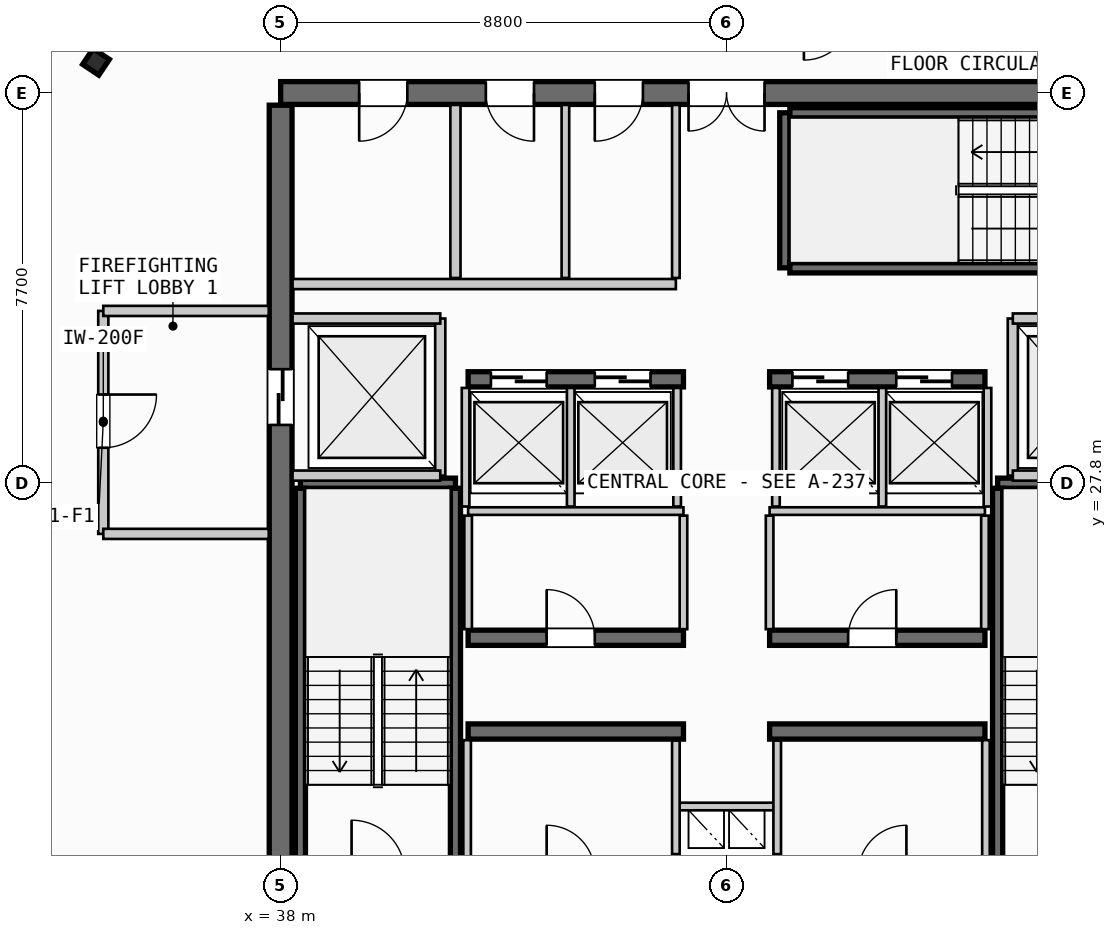
"""IFC4 building model, lengths in metres.
Left out: names, types, materials, properties, quantities, classifications, styles, units other than length and angle.
Written with IfcOpenShell. Run it as: python <this file> out.ifc"""

import sys

from ifc_helpers import new_model, si_unit, direction, frame, frame_2d, origin, origin_2d, place, context, subcontext, project, spatial, rectangle, i_section, extrude, source, transform, mapped, element, fill, save


model = new_model("IFC4")
c1 = context("Model", 3, precision=1e-05, world=origin(), true_north=direction((0.0, 1.0)))
c2 = subcontext(c1, "Body", "Model", "MODEL_VIEW")
j1 = project(units=[si_unit("LENGTHUNIT", "METRE"), si_unit("PLANEANGLEUNIT", "RADIAN")], contexts=[c1])
p1 = place(None, origin())
s1 = spatial("IfcSite", under=j1, at=p1, CompositionType="ELEMENT")
p2 = place(p1, origin())
s2 = spatial("IfcBuilding", under=s1, at=p2, CompositionType="ELEMENT")
p3 = place(p2, frame((0.0, 0.0, 269.8)))
s3 = spatial("IfcBuildingStorey", under=s2, at=p3, CompositionType="ELEMENT", Elevation=269.8)
p4 = place(p3, frame((55.6, 35.5, 0.0), z_axis=(0.0, 0.0, 1.0), x_axis=(-1.0, 0.0, 0.0)))
e1 = element("IfcWall", 1, at=p4, inside=s3, PredefinedType="SHEAR", context=c2, shape_type="SweptSolid", body=[
    extrude(rectangle(XDim=17.6, YDim=0.45, at=frame_2d((8.8, 0.0))), origin(), (0.0, 0.0, 1.0), 3.21),
])
p5 = place(p4, frame((8.05, 0.0, 0.0)))
e2 = element("IfcOpeningElement", 2, at=p5, cuts=e1, PredefinedType="OPENING", context=c2, shape_type="SweptSolid", body=[
    extrude(rectangle(XDim=1.5, YDim=2.2, at=frame_2d((0.75, 1.1))), frame((0.0, 0.235, 0.0), z_axis=(0.0, -1.0, 0.0), x_axis=(1.0, 0.0, 0.0)), (0.0, 0.0, 1.0), 0.47),
])
p6 = place(p4, frame((15.1, 0.0, 0.0)))
e3 = element("IfcOpeningElement", 3, at=p6, cuts=e1, PredefinedType="OPENING", context=c2, shape_type="SweptSolid", body=[
    extrude(rectangle(XDim=0.95, YDim=2.15, at=frame_2d((0.475, 1.075))), frame((0.0, 0.235, 0.0), z_axis=(0.0, -1.0, 0.0), x_axis=(1.0, 0.0, 0.0)), (0.0, 0.0, 1.0), 0.47),
])
p7 = place(p4, frame((12.6, 0.0, 0.0)))
e4 = element("IfcOpeningElement", 4, at=p7, cuts=e1, PredefinedType="OPENING", context=c2, shape_type="SweptSolid", body=[
    extrude(rectangle(XDim=0.95, YDim=2.15, at=frame_2d((0.475, 1.075))), frame((0.0, 0.235, 0.0), z_axis=(0.0, -1.0, 0.0), x_axis=(1.0, 0.0, 0.0)), (0.0, 0.0, 1.0), 0.47),
])
p8 = place(p4, frame((10.45, 0.0, 0.0)))
e5 = element("IfcOpeningElement", 5, at=p8, cuts=e1, PredefinedType="OPENING", context=c2, shape_type="SweptSolid", body=[
    extrude(rectangle(XDim=0.95, YDim=2.15, at=frame_2d((0.475, 1.075))), frame((0.0, 0.235, 0.0), z_axis=(0.0, -1.0, 0.0), x_axis=(1.0, 0.0, 0.0)), (0.0, 0.0, 1.0), 0.47),
])
p9 = place(p3, frame((38.0, 35.26, 0.0), z_axis=(0.0, 0.0, 1.0), x_axis=(0.0, -1.0, 0.0)))
e6 = element("IfcWall", 6, at=p9, inside=s3, PredefinedType="SHEAR", context=c2, shape_type="SweptSolid", body=[
    extrude(rectangle(XDim=14.92, YDim=0.45, at=frame_2d((7.46, 0.0))), origin(), (0.0, 0.0, 1.0), 3.21),
])
p10 = place(p9, frame((5.21, 0.0, 0.0)))
e7 = element("IfcOpeningElement", 7, at=p10, cuts=e6, PredefinedType="OPENING", context=c2, shape_type="SweptSolid", body=[
    extrude(rectangle(XDim=1.1, YDim=2.2, at=frame_2d((0.55, 1.1))), frame((0.0, 0.235, 0.0), z_axis=(0.0, -1.0, 0.0), x_axis=(1.0, 0.0, 0.0)), (0.0, 0.0, 1.0), 0.47),
])
for number, where, z_axis, x_axis in (
    (8, (41.7, 22.9, 0.0), (0.0, 0.0, 1.0), (1.0, 0.0, 0.0)),
    (9, (47.65, 22.9, 0.0), (0.0, 0.0, 1.0), (1.0, 0.0, 0.0)),
):
    element("IfcWall", number, at=place(p3, frame(where, z_axis=z_axis, x_axis=x_axis)), inside=s3, PredefinedType="SHEAR", context=c2, shape_type="SweptSolid", body=[
        extrude(rectangle(XDim=4.25, YDim=0.3, at=frame_2d((2.125, 0.0))), origin(), (0.0, 0.0, 1.0), 3.21),
    ])
p11 = place(p3, frame((41.7, 24.75, 0.0), z_axis=(0.0, 0.0, 1.0), x_axis=(1.0, 0.0, 0.0)))
e10 = element("IfcWall", 10, at=p11, inside=s3, PredefinedType="SHEAR", context=c2, shape_type="SweptSolid", body=[
    extrude(rectangle(XDim=4.25, YDim=0.3, at=frame_2d((2.125, 0.0))), origin(), (0.0, 0.0, 1.0), 3.21),
])
p12 = place(p11, frame((1.55, 0.0, 0.0)))
e11 = element("IfcOpeningElement", 11, at=p12, cuts=e10, PredefinedType="OPENING", context=c2, shape_type="SweptSolid", body=[
    extrude(rectangle(XDim=0.95, YDim=2.15, at=frame_2d((0.475, 1.075))), frame((0.0, 0.16, 0.0), z_axis=(0.0, -1.0, 0.0), x_axis=(1.0, 0.0, 0.0)), (0.0, 0.0, 1.0), 0.32),
])
p13 = place(p3, frame((47.65, 24.75, 0.0), z_axis=(0.0, 0.0, 1.0), x_axis=(1.0, 0.0, 0.0)))
e12 = element("IfcWall", 12, at=p13, inside=s3, PredefinedType="SHEAR", context=c2, shape_type="SweptSolid", body=[
    extrude(rectangle(XDim=4.25, YDim=0.3, at=frame_2d((2.125, 0.0))), origin(), (0.0, 0.0, 1.0), 3.21),
])
p14 = place(p13, frame((1.55, 0.0, 0.0)))
e13 = element("IfcOpeningElement", 13, at=p14, cuts=e12, PredefinedType="OPENING", context=c2, shape_type="SweptSolid", body=[
    extrude(rectangle(XDim=0.95, YDim=2.15, at=frame_2d((0.475, 1.075))), frame((0.0, 0.16, 0.0), z_axis=(0.0, -1.0, 0.0), x_axis=(1.0, 0.0, 0.0)), (0.0, 0.0, 1.0), 0.32),
])
p15 = place(p3, frame((41.7, 29.85, 0.0), z_axis=(0.0, 0.0, 1.0), x_axis=(1.0, 0.0, 0.0)))
e14 = element("IfcWall", 14, at=p15, inside=s3, PredefinedType="SHEAR", context=c2, shape_type="SweptSolid", body=[
    extrude(rectangle(XDim=4.25, YDim=0.3, at=frame_2d((2.125, 0.0))), origin(), (0.0, 0.0, 1.0), 3.21),
])
p16 = place(p15, frame((0.45, 0.0, 0.0)))
e15 = element("IfcOpeningElement", 15, at=p16, cuts=e14, PredefinedType="OPENING", context=c2, shape_type="SweptSolid", body=[
    extrude(rectangle(XDim=1.1, YDim=2.2, at=frame_2d((0.55, 1.1))), frame((0.0, 0.16, 0.0), z_axis=(0.0, -1.0, 0.0), x_axis=(1.0, 0.0, 0.0)), (0.0, 0.0, 1.0), 0.32),
])
p17 = place(p15, frame((2.5, 0.0, 0.0)))
e16 = element("IfcOpeningElement", 16, at=p17, cuts=e14, PredefinedType="OPENING", context=c2, shape_type="SweptSolid", body=[
    extrude(rectangle(XDim=1.1, YDim=2.2, at=frame_2d((0.55, 1.1))), frame((0.0, 0.16, 0.0), z_axis=(0.0, -1.0, 0.0), x_axis=(1.0, 0.0, 0.0)), (0.0, 0.0, 1.0), 0.32),
])
p18 = place(p3, frame((47.65, 29.85, 0.0), z_axis=(0.0, 0.0, 1.0), x_axis=(1.0, 0.0, 0.0)))
e17 = element("IfcWall", 17, at=p18, inside=s3, PredefinedType="SHEAR", context=c2, shape_type="SweptSolid", body=[
    extrude(rectangle(XDim=4.25, YDim=0.3, at=frame_2d((2.125, 0.0))), origin(), (0.0, 0.0, 1.0), 3.21),
])
p19 = place(p18, frame((0.45, 0.0, 0.0)))
e18 = element("IfcOpeningElement", 18, at=p19, cuts=e17, PredefinedType="OPENING", context=c2, shape_type="SweptSolid", body=[
    extrude(rectangle(XDim=1.1, YDim=2.2, at=frame_2d((0.55, 1.1))), frame((0.0, 0.16, 0.0), z_axis=(0.0, -1.0, 0.0), x_axis=(1.0, 0.0, 0.0)), (0.0, 0.0, 1.0), 0.32),
])
p20 = place(p18, frame((2.5, 0.0, 0.0)))
e19 = element("IfcOpeningElement", 19, at=p20, cuts=e17, PredefinedType="OPENING", context=c2, shape_type="SweptSolid", body=[
    extrude(rectangle(XDim=1.1, YDim=2.2, at=frame_2d((0.55, 1.1))), frame((0.0, 0.16, 0.0), z_axis=(0.0, -1.0, 0.0), x_axis=(1.0, 0.0, 0.0)), (0.0, 0.0, 1.0), 0.32),
])
m1 = source(origin(), c2, "Body", "SweptSolid", [
    extrude(i_section(OverallWidth=0.374, OverallDepth=0.383, WebThickness=0.017, FlangeThickness=0.026, FilletRadius=0.015, at=origin_2d()), origin(), (0.0, 0.0, 1.0), 3.21),
])
p21 = place(p3, frame((34.356, 36.115, 0.0), z_axis=(0.0, 0.0, 1.0), x_axis=(-0.831469612303, 0.55557023302, 0.0)))
e20 = element("IfcColumn", 20, at=p21, inside=s3, PredefinedType="COLUMN", context=c2, shape_type="MappedRepresentation", body=[
    mapped(m1, transform((0.0, 0.0, 0.0), scale=1.0)),
])
p22 = place(p3, frame((38.39, 27.8, 0.0), z_axis=(0.0, 0.0, 1.0), x_axis=(1.0, 0.0, 0.0)))
e21 = element("IfcWall", 21, at=p22, inside=s3, PredefinedType="SHEAR", context=c2, shape_type="SweptSolid", body=[
    extrude(rectangle(XDim=3.06, YDim=0.2, at=frame_2d((1.53, 0.0))), origin(), (0.0, 0.0, 1.0), 3.21),
])
for number, where, z_axis, x_axis in (
    (22, (41.45, 27.7, 0.0), (0.0, 0.0, 1.0), (0.0, -1.0, 0.0)),
    (23, (38.39, 20.35, 0.0), (0.0, 0.0, 1.0), (0.0, 1.0, 0.0)),
):
    element("IfcWall", number, at=place(p3, frame(where, z_axis=z_axis, x_axis=x_axis)), inside=s3, PredefinedType="SHEAR", context=c2, shape_type="SweptSolid", body=[
        extrude(rectangle(XDim=7.35, YDim=0.2, at=frame_2d((3.675, 0.0))), origin(), (0.0, 0.0, 1.0), 3.21),
    ])
p23 = place(p3, frame((52.15, 27.8, 0.0), z_axis=(0.0, 0.0, 1.0), x_axis=(1.0, 0.0, 0.0)))
e24 = element("IfcWall", 24, at=p23, inside=s3, PredefinedType="SHEAR", context=c2, shape_type="SweptSolid", body=[
    extrude(rectangle(XDim=3.06, YDim=0.2, at=frame_2d((1.53, 0.0))), origin(), (0.0, 0.0, 1.0), 3.21),
])
p24 = place(p3, frame((52.15, 20.35, 0.0), z_axis=(0.0, 0.0, 1.0), x_axis=(0.0, 1.0, 0.0)))
e25 = element("IfcWall", 25, at=p24, inside=s3, PredefinedType="SHEAR", context=c2, shape_type="SweptSolid", body=[
    extrude(rectangle(XDim=7.35, YDim=0.2, at=frame_2d((3.675, 0.0))), origin(), (0.0, 0.0, 1.0), 3.21),
])
p25 = place(p3, frame((47.95, 32.05, 0.0), z_axis=(0.0, 0.0, 1.0), x_axis=(0.0, 1.0, 0.0)))
e26 = element("IfcWall", 26, at=p25, inside=s3, PredefinedType="SHEAR", context=c2, shape_type="SweptSolid", body=[
    extrude(rectangle(XDim=3.06, YDim=0.2, at=frame_2d((1.53, 0.0))), origin(), (0.0, 0.0, 1.0), 3.21),
])
for number, where, z_axis, x_axis in (
    (27, (48.05, 35.11, 0.0), (0.0, 0.0, 1.0), (1.0, 0.0, 0.0)),
    (28, (55.4, 32.05, 0.0), (0.0, 0.0, 1.0), (-1.0, 0.0, 0.0)),
):
    element("IfcWall", number, at=place(p3, frame(where, z_axis=z_axis, x_axis=x_axis)), inside=s3, PredefinedType="SHEAR", context=c2, shape_type="SweptSolid", body=[
        extrude(rectangle(XDim=7.35, YDim=0.2, at=frame_2d((3.675, 0.0))), origin(), (0.0, 0.0, 1.0), 3.21),
    ])
p26 = place(p3, frame((45.8, 21.42, 0.0), z_axis=(0.0, 0.0, 1.0), x_axis=(1.0, 0.0, 0.0)))
e29 = element("IfcWall", 29, at=p26, inside=s3, PredefinedType="PARTITIONING", context=c2, shape_type="SweptSolid", body=[
    extrude(rectangle(XDim=2.0, YDim=0.15, at=frame_2d((1.0, 0.0))), origin(), (0.0, 0.0, 1.0), 2.595),
])
for number, where, z_axis, x_axis in (
    (30, (45.8, 20.48, 0.0), (0.0, 0.0, 1.0), (0.0, 1.0, 0.0)),
    (31, (47.8, 20.48, 0.0), (0.0, 0.0, 1.0), (0.0, 1.0, 0.0)),
):
    element("IfcWall", number, at=place(p3, frame(where, z_axis=z_axis, x_axis=x_axis)), inside=s3, PredefinedType="PARTITIONING", context=c2, shape_type="SweptSolid", body=[
        extrude(rectangle(XDim=2.24, YDim=0.15, at=frame_2d((1.12, 0.0))), origin(), (0.0, 0.0, 1.0), 2.595),
    ])
p27 = place(p3, frame((41.15, 27.95, 0.0), z_axis=(0.0, 0.0, 1.0), x_axis=(0.0, 1.0, 0.0)))
e32 = element("IfcWall", 32, at=p27, inside=s3, PredefinedType="PARTITIONING", context=c2, shape_type="SweptSolid", body=[
    extrude(rectangle(XDim=3.1, YDim=0.2, at=frame_2d((1.55, 0.0))), origin(), (0.0, 0.0, 1.0), 2.595),
])
for number, where, z_axis, x_axis in (
    (33, (38.235, 27.95, 0.0), (0.0, 0.0, 1.0), (1.0, 0.0, 0.0)),
    (34, (38.235, 31.05, 0.0), (0.0, 0.0, 1.0), (1.0, 0.0, 0.0)),
):
    element("IfcWall", number, at=place(p3, frame(where, z_axis=z_axis, x_axis=x_axis)), inside=s3, PredefinedType="PARTITIONING", context=c2, shape_type="SweptSolid", body=[
        extrude(rectangle(XDim=2.915, YDim=0.2, at=frame_2d((1.458, 0.0))), origin(), (0.0, 0.0, 1.0), 2.595),
    ])
p28 = place(p3, frame((34.5, 31.2, 0.0), z_axis=(0.0, 0.0, 1.0), x_axis=(0.0, -1.0, 0.0)))
e35 = element("IfcWall", 35, at=p28, inside=s3, PredefinedType="PARTITIONING", context=c2, shape_type="SweptSolid", body=[
    extrude(rectangle(XDim=4.4, YDim=0.2, at=frame_2d((2.2, 0.0))), origin(), (0.0, 0.0, 1.0), 2.595),
])
p29 = place(p28, frame((1.65, 0.0, 0.0)))
e36 = element("IfcOpeningElement", 36, at=p29, cuts=e35, PredefinedType="OPENING", context=c2, shape_type="SweptSolid", body=[
    extrude(rectangle(XDim=1.05, YDim=2.15, at=frame_2d((0.525, 1.075))), frame((0.0, 0.11, 0.0), z_axis=(0.0, -1.0, 0.0), x_axis=(1.0, 0.0, 0.0)), (0.0, 0.0, 1.0), 0.22),
])
for number, where, z_axis, x_axis in (
    (37, (34.5, 26.8, 0.0), (0.0, 0.0, 1.0), (1.0, 0.0, 0.0)),
    (38, (34.5, 31.2, 0.0), (0.0, 0.0, 1.0), (1.0, 0.0, 0.0)),
):
    element("IfcWall", number, at=place(p3, frame(where, z_axis=z_axis, x_axis=x_axis)), inside=s3, PredefinedType="PARTITIONING", context=c2, shape_type="SweptSolid", body=[
        extrude(rectangle(XDim=3.265, YDim=0.2, at=frame_2d((1.632, 0.0))), origin(), (0.0, 0.0, 1.0), 2.595),
    ])
p30 = place(p3, frame((52.45, 27.95, 0.0), z_axis=(0.0, 0.0, 1.0), x_axis=(0.0, 1.0, 0.0)))
e39 = element("IfcWall", 39, at=p30, inside=s3, PredefinedType="PARTITIONING", context=c2, shape_type="SweptSolid", body=[
    extrude(rectangle(XDim=3.1, YDim=0.2, at=frame_2d((1.55, 0.0))), origin(), (0.0, 0.0, 1.0), 2.595),
])
for number, where, z_axis, x_axis in (
    (40, (52.45, 27.95, 0.0), (0.0, 0.0, 1.0), (1.0, 0.0, 0.0)),
    (41, (52.45, 31.05, 0.0), (0.0, 0.0, 1.0), (1.0, 0.0, 0.0)),
):
    element("IfcWall", number, at=place(p3, frame(where, z_axis=z_axis, x_axis=x_axis)), inside=s3, PredefinedType="PARTITIONING", context=c2, shape_type="SweptSolid", body=[
        extrude(rectangle(XDim=2.915, YDim=0.2, at=frame_2d((1.458, 0.0))), origin(), (0.0, 0.0, 1.0), 2.595),
    ])
for number, where, z_axis, x_axis in (
    (42, (41.68, 20.335, 0.0), (0.0, 0.0, 1.0), (0.0, 1.0, 0.0)),
    (43, (51.92, 20.335, 0.0), (0.0, 0.0, 1.0), (0.0, 1.0, 0.0)),
):
    element("IfcWall", number, at=place(p3, frame(where, z_axis=z_axis, x_axis=x_axis)), inside=s3, PredefinedType="PARTITIONING", context=c2, shape_type="SweptSolid", body=[
        extrude(rectangle(XDim=2.395, YDim=0.15, at=frame_2d((1.198, 0.0))), origin(), (0.0, 0.0, 1.0), 2.595),
    ])
for number, where, z_axis, x_axis in (
    (44, (41.7, 27.25, 0.0), (0.0, 0.0, 1.0), (1.0, 0.0, 0.0)),
    (45, (47.65, 27.25, 0.0), (0.0, 0.0, 1.0), (1.0, 0.0, 0.0)),
):
    element("IfcWall", number, at=place(p3, frame(where, z_axis=z_axis, x_axis=x_axis)), inside=s3, PredefinedType="PARTITIONING", context=c2, shape_type="SweptSolid", body=[
        extrude(rectangle(XDim=4.25, YDim=0.15, at=frame_2d((2.125, 0.0))), origin(), (0.0, 0.0, 1.0), 2.595),
    ])
for number, where, z_axis, x_axis in (
    (46, (41.7, 24.92, 0.0), (0.0, 0.0, 1.0), (0.0, 1.0, 0.0)),
    (47, (45.95, 24.92, 0.0), (0.0, 0.0, 1.0), (0.0, 1.0, 0.0)),
    (48, (47.65, 24.92, 0.0), (0.0, 0.0, 1.0), (0.0, 1.0, 0.0)),
    (49, (51.9, 24.92, 0.0), (0.0, 0.0, 1.0), (0.0, 1.0, 0.0)),
):
    element("IfcWall", number, at=place(p3, frame(where, z_axis=z_axis, x_axis=x_axis)), inside=s3, PredefinedType="PARTITIONING", context=c2, shape_type="SweptSolid", body=[
        extrude(rectangle(XDim=2.24, YDim=0.15, at=frame_2d((1.12, 0.0))), origin(), (0.0, 0.0, 1.0), 2.595),
    ])
for number, where, z_axis, x_axis in (
    (50, (41.65, 27.34, 0.0), (0.0, 0.0, 1.0), (0.0, 1.0, 0.0)),
    (51, (43.725, 27.34, 0.0), (0.0, 0.0, 1.0), (0.0, 1.0, 0.0)),
    (52, (45.825, 27.34, 0.0), (0.0, 0.0, 1.0), (0.0, 1.0, 0.0)),
    (53, (47.775, 27.34, 0.0), (0.0, 0.0, 1.0), (0.0, 1.0, 0.0)),
    (54, (49.875, 27.34, 0.0), (0.0, 0.0, 1.0), (0.0, 1.0, 0.0)),
    (55, (51.95, 27.34, 0.0), (0.0, 0.0, 1.0), (0.0, 1.0, 0.0)),
):
    element("IfcWall", number, at=place(p3, frame(where, z_axis=z_axis, x_axis=x_axis)), inside=s3, PredefinedType="PARTITIONING", context=c2, shape_type="SweptSolid", body=[
        extrude(rectangle(XDim=2.34, YDim=0.15, at=frame_2d((1.17, 0.0))), origin(), (0.0, 0.0, 1.0), 2.595),
    ])
p31 = place(p3, frame((41.45, 31.85, 0.0), z_axis=(0.0, 0.0, 1.0), x_axis=(0.0, 1.0, 0.0)))
e56 = element("IfcWall", 56, at=p31, inside=s3, PredefinedType="PARTITIONING", context=c2, shape_type="SweptSolid", body=[
    extrude(rectangle(XDim=3.415, YDim=0.2, at=frame_2d((1.708, 0.0))), origin(), (0.0, 0.0, 1.0), 2.595),
])
p32 = place(p3, frame((38.235, 31.73, 0.0), z_axis=(0.0, 0.0, 1.0), x_axis=(1.0, 0.0, 0.0)))
e57 = element("IfcWall", 57, at=p32, inside=s3, PredefinedType="PARTITIONING", context=c2, shape_type="SweptSolid", body=[
    extrude(rectangle(XDim=7.565, YDim=0.2, at=frame_2d((3.782, 0.0))), origin(), (0.0, 0.0, 1.0), 2.595),
])
p33 = place(p3, frame((45.8, 31.85, 0.0), z_axis=(0.0, 0.0, 1.0), x_axis=(0.0, 1.0, 0.0)))
e58 = element("IfcWall", 58, at=p33, inside=s3, PredefinedType="PARTITIONING", context=c2, shape_type="SweptSolid", body=[
    extrude(rectangle(XDim=3.415, YDim=0.15, at=frame_2d((1.708, 0.0))), origin(), (0.0, 0.0, 1.0), 2.595),
])
p34 = place(p3, frame((43.62, 31.85, 0.0), z_axis=(0.0, 0.0, 1.0), x_axis=(0.0, 1.0, 0.0)))
e59 = element("IfcWall", 59, at=p34, inside=s3, PredefinedType="PLUMBINGWALL", context=c2, shape_type="SweptSolid", body=[
    extrude(rectangle(XDim=3.415, YDim=0.15, at=frame_2d((1.708, 0.0))), origin(), (0.0, 0.0, 1.0), 2.595),
])
m2 = source(origin(), c2, "Body", "SweptSolid", [
    extrude(rectangle(XDim=1.5, YDim=2.2, at=frame_2d((0.75, 1.1))), frame((0.0, 0.025, 0.0), z_axis=(0.0, -1.0, 0.0), x_axis=(1.0, 0.0, 0.0)), (0.0, 0.0, 1.0), 0.05),
])
p35 = place(p5, origin())
e60 = element("IfcDoor", 60, at=p35, inside=s3, OperationType="DOUBLE_DOOR_SINGLE_SWING", PredefinedType="DOOR", context=c2, shape_type="MappedRepresentation", body=[
    mapped(m2, transform((0.0, 0.0, 0.0), scale=1.0)),
])
fill(e2, e60)
m3 = source(origin(), c2, "Body", "SweptSolid", [
    extrude(rectangle(XDim=1.1, YDim=2.2, at=frame_2d((0.55, 1.1))), frame((0.0, 0.025, 0.0), z_axis=(0.0, -1.0, 0.0), x_axis=(1.0, 0.0, 0.0)), (0.0, 0.0, 1.0), 0.05),
])
p36 = place(p10, origin())
e61 = element("IfcDoor", 61, at=p36, inside=s3, OperationType="SLIDING_TO_LEFT", PredefinedType="DOOR", context=c2, shape_type="MappedRepresentation", body=[
    mapped(m3, transform((0.0, 0.0, 0.0), scale=1.0)),
])
fill(e7, e61)
m4 = source(origin(), c2, "Body", "SweptSolid", [
    extrude(rectangle(XDim=0.95, YDim=2.15, at=frame_2d((0.475, 1.075))), frame((0.0, 0.025, 0.0), z_axis=(0.0, -1.0, 0.0), x_axis=(1.0, 0.0, 0.0)), (0.0, 0.0, 1.0), 0.05),
])
p37 = place(p12, origin())
e62 = element("IfcDoor", 62, at=p37, inside=s3, OperationType="SINGLE_SWING_LEFT", PredefinedType="DOOR", context=c2, shape_type="MappedRepresentation", body=[
    mapped(m4, transform((0.0, 0.0, 0.0), scale=1.0)),
])
fill(e11, e62)
p38 = place(p14, origin())
e63 = element("IfcDoor", 63, at=p38, inside=s3, OperationType="SINGLE_SWING_RIGHT", PredefinedType="DOOR", context=c2, shape_type="MappedRepresentation", body=[
    mapped(m4, transform((0.0, 0.0, 0.0), scale=1.0)),
])
fill(e13, e63)
p39 = place(p16, origin())
e64 = element("IfcDoor", 64, at=p39, inside=s3, OperationType="SLIDING_TO_LEFT", PredefinedType="DOOR", context=c2, shape_type="MappedRepresentation", body=[
    mapped(m3, transform((0.0, 0.0, 0.0), scale=1.0)),
])
fill(e15, e64)
p40 = place(p17, origin())
e65 = element("IfcDoor", 65, at=p40, inside=s3, OperationType="SLIDING_TO_LEFT", PredefinedType="DOOR", context=c2, shape_type="MappedRepresentation", body=[
    mapped(m3, transform((0.0, 0.0, 0.0), scale=1.0)),
])
fill(e16, e65)
p41 = place(p19, origin())
e66 = element("IfcDoor", 66, at=p41, inside=s3, OperationType="SLIDING_TO_LEFT", PredefinedType="DOOR", context=c2, shape_type="MappedRepresentation", body=[
    mapped(m3, transform((0.0, 0.0, 0.0), scale=1.0)),
])
fill(e18, e66)
p42 = place(p20, origin())
e67 = element("IfcDoor", 67, at=p42, inside=s3, OperationType="SLIDING_TO_LEFT", PredefinedType="DOOR", context=c2, shape_type="MappedRepresentation", body=[
    mapped(m3, transform((0.0, 0.0, 0.0), scale=1.0)),
])
fill(e19, e67)
p43 = place(p6, origin())
e68 = element("IfcDoor", 68, at=p43, inside=s3, OperationType="SINGLE_SWING_RIGHT", PredefinedType="DOOR", context=c2, shape_type="MappedRepresentation", body=[
    mapped(m4, transform((0.0, 0.0, 0.0), scale=1.0)),
])
fill(e3, e68)
p44 = place(p7, origin())
e69 = element("IfcDoor", 69, at=p44, inside=s3, OperationType="SINGLE_SWING_LEFT", PredefinedType="DOOR", context=c2, shape_type="MappedRepresentation", body=[
    mapped(m4, transform((0.0, 0.0, 0.0), scale=1.0)),
])
fill(e4, e69)
p45 = place(p8, origin())
e70 = element("IfcDoor", 70, at=p45, inside=s3, OperationType="SINGLE_SWING_RIGHT", PredefinedType="DOOR", context=c2, shape_type="MappedRepresentation", body=[
    mapped(m4, transform((0.0, 0.0, 0.0), scale=1.0)),
])
fill(e5, e70)
m5 = source(origin(), c2, "Body", "SweptSolid", [
    extrude(rectangle(XDim=1.05, YDim=2.15, at=frame_2d((0.525, 1.075))), frame((0.0, 0.025, 0.0), z_axis=(0.0, -1.0, 0.0), x_axis=(1.0, 0.0, 0.0)), (0.0, 0.0, 1.0), 0.05),
])
p46 = place(p29, origin())
e71 = element("IfcDoor", 71, at=p46, inside=s3, OperationType="SINGLE_SWING_LEFT", PredefinedType="DOOR", context=c2, shape_type="MappedRepresentation", body=[
    mapped(m5, transform((0.0, 0.0, 0.0), scale=1.0)),
])
fill(e36, e71)
save(model, sys.argv[1])
